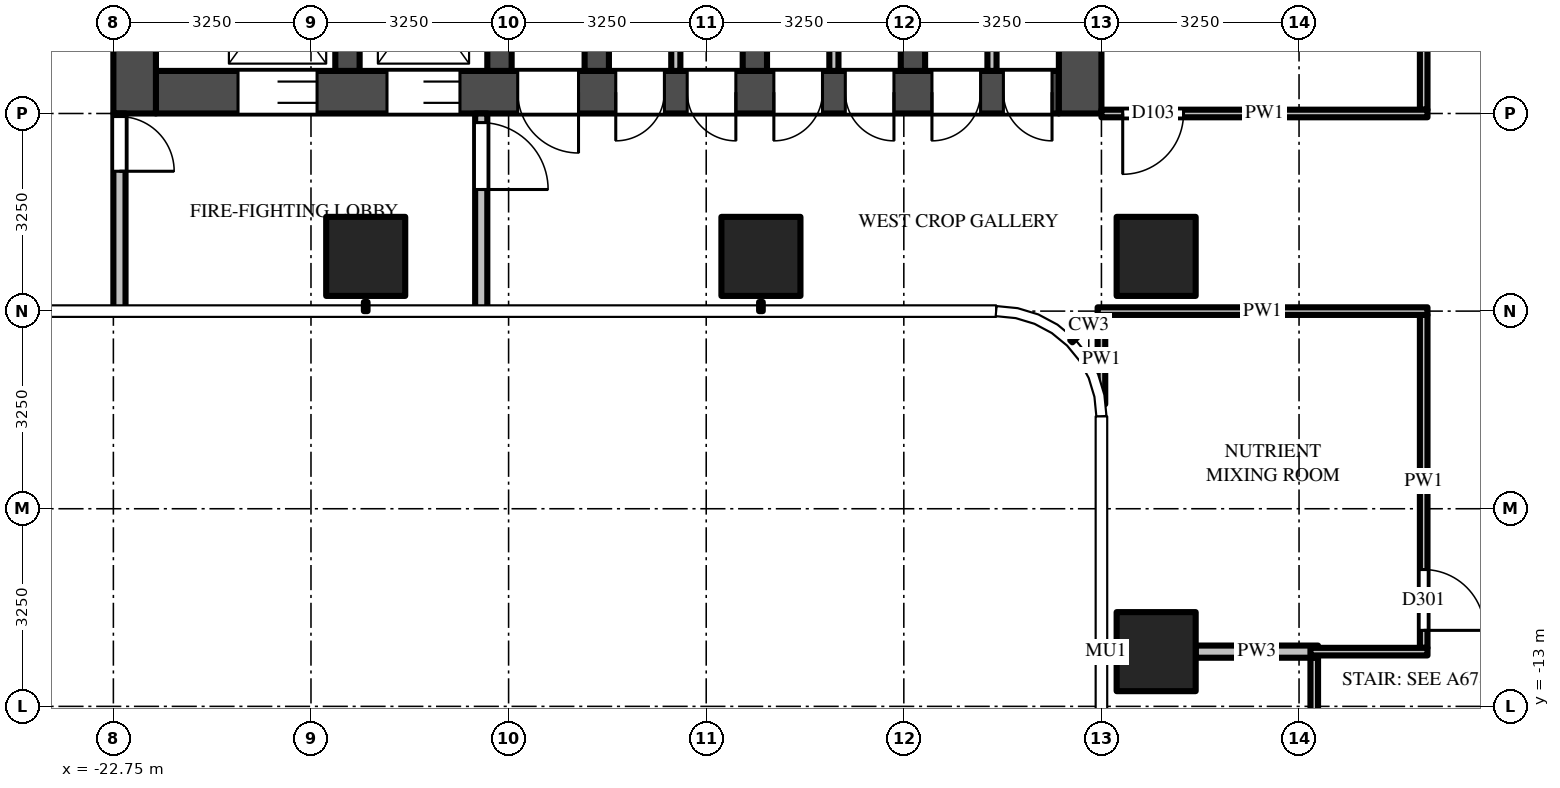
"""IFC4 building model, lengths in metres.
Left out: names, types, materials, properties, quantities, classifications, styles, units other than length and angle.
Written with IfcOpenShell. Run it as: python <this file> out.ifc"""

import sys

from ifc_helpers import new_model, si_unit, direction, frame, frame_2d, origin, origin_2d, place, context, subcontext, project, spatial, rectangle, extrude, source, transform, mapped, element, fill, save


model = new_model("IFC4")
c1 = context("Model", 3, precision=1e-05, world=origin(), true_north=direction((0.0, 1.0)))
c2 = subcontext(c1, "Body", "Model", "MODEL_VIEW")
j1 = project(units=[si_unit("LENGTHUNIT", "METRE"), si_unit("PLANEANGLEUNIT", "RADIAN")], contexts=[c1])
p1 = place(None, origin())
s1 = spatial("IfcSite", under=j1, at=p1, CompositionType="ELEMENT")
p2 = place(p1, origin())
s2 = spatial("IfcBuilding", under=s1, at=p2, CompositionType="ELEMENT")
p3 = place(p2, frame((0.0, 0.0, 115.5)))
s3 = spatial("IfcBuildingStorey", under=s2, at=p3, CompositionType="ELEMENT", Elevation=115.5)
m1 = source(origin(), c2, "Body", "SweptSolid", [
    extrude(rectangle(XDim=1.3, YDim=1.3, at=origin_2d()), origin(), (0.0, 0.0, 1.0), 4.5),
])
for number, where, z_axis, x_axis in (
    (1, (-5.6, -5.6, 0.0), (0.0, 0.0, 1.0), (1.0, 0.0, 0.0)),
    (2, (-5.6, -12.1, 0.0), (0.0, 0.0, 1.0), (1.0, 0.0, 0.0)),
    (3, (-12.1, -5.6, 0.0), (0.0, 0.0, 1.0), (1.0, 0.0, 0.0)),
    (4, (-18.6, -5.6, 0.0), (0.0, 0.0, 1.0), (1.0, 0.0, 0.0)),
):
    element("IfcColumn", number, at=place(p3, frame(where, z_axis=z_axis, x_axis=x_axis)), inside=s3, PredefinedType="COLUMN", context=c2, shape_type="MappedRepresentation", body=[
        mapped(m1, transform((0.0, 0.0, 0.0))),
    ])
m2 = source(origin(), c2, "Body", "SweptSolid", [
    extrude(rectangle(XDim=14.85, YDim=0.7, at=frame_2d((7.425, 0.0))), origin(), (0.0, 0.0, 1.0), 4.25),
])
p4 = place(p3, frame((-7.2, -2.9, 0.0), z_axis=(0.0, 0.0, 1.0), x_axis=(-1.0, 0.0, 0.0)))
e5 = element("IfcWall", 5, at=p4, inside=s3, PredefinedType="SHEAR", context=c2, shape_type="MappedRepresentation", body=[
    mapped(m2, transform((0.0, 0.0, 0.0))),
])
m3 = source(origin(), c2, "Body", "SweptSolid", [
    extrude(rectangle(XDim=1.3, YDim=2.1, at=frame_2d((0.65, 1.05))), frame((0.0, 0.36, 0.0), z_axis=(0.0, -1.0, 0.0), x_axis=(1.0, 0.0, 0.0)), (0.0, 0.0, 1.0), 0.72),
])
p5 = place(p4, frame((12.2, 0.0, 0.0)))
e6 = element("IfcOpeningElement", 6, at=p5, cuts=e5, PredefinedType="OPENING", context=c2, shape_type="MappedRepresentation", body=[
    mapped(m3, transform((0.0, 0.0, 0.0))),
])
m4 = source(origin(), c2, "Body", "SweptSolid", [
    extrude(rectangle(XDim=1.2, YDim=2.1, at=frame_2d((0.6, 1.05))), frame((0.0, 0.36, 0.0), z_axis=(0.0, -1.0, 0.0), x_axis=(1.0, 0.0, 0.0)), (0.0, 0.0, 1.0), 0.72),
])
p6 = place(p4, frame((9.85, 0.0, 0.0)))
e7 = element("IfcOpeningElement", 7, at=p6, cuts=e5, PredefinedType="OPENING", context=c2, shape_type="MappedRepresentation", body=[
    mapped(m4, transform((0.0, 0.0, 0.0))),
])
m5 = source(origin(), c2, "Body", "SweptSolid", [
    extrude(rectangle(XDim=1.0, YDim=2.1, at=frame_2d((0.5, 1.05))), frame((0.0, 0.36, 0.0), z_axis=(0.0, -1.0, 0.0), x_axis=(1.0, 0.0, 0.0)), (0.0, 0.0, 1.0), 0.72),
])
p7 = place(p4, frame((7.9, 0.0, 0.0)))
e8 = element("IfcOpeningElement", 8, at=p7, cuts=e5, PredefinedType="OPENING", context=c2, shape_type="MappedRepresentation", body=[
    mapped(m5, transform((0.0, 0.0, 0.0))),
])
m6 = source(origin(), c2, "Body", "SweptSolid", [
    extrude(rectangle(XDim=0.8, YDim=2.1, at=frame_2d((0.4, 1.05))), frame((0.0, 0.36, 0.0), z_axis=(0.0, -1.0, 0.0), x_axis=(1.0, 0.0, 0.0)), (0.0, 0.0, 1.0), 0.72),
])
p8 = place(p4, frame((0.113, 0.0, 0.0)))
e9 = element("IfcOpeningElement", 9, at=p8, cuts=e5, PredefinedType="OPENING", context=c2, shape_type="MappedRepresentation", body=[
    mapped(m6, transform((0.0, 0.0, 0.0))),
])
p9 = place(p4, frame((1.288, 0.0, 0.0)))
e10 = element("IfcOpeningElement", 10, at=p9, cuts=e5, PredefinedType="OPENING", context=c2, shape_type="MappedRepresentation", body=[
    mapped(m6, transform((0.0, 0.0, 0.0))),
])
p10 = place(p4, frame((2.712, 0.0, 0.0)))
e11 = element("IfcOpeningElement", 11, at=p10, cuts=e5, PredefinedType="OPENING", context=c2, shape_type="MappedRepresentation", body=[
    mapped(m6, transform((0.0, 0.0, 0.0))),
])
p11 = place(p4, frame((3.887, 0.0, 0.0)))
e12 = element("IfcOpeningElement", 12, at=p11, cuts=e5, PredefinedType="OPENING", context=c2, shape_type="MappedRepresentation", body=[
    mapped(m6, transform((0.0, 0.0, 0.0))),
])
p12 = place(p4, frame((5.312, 0.0, 0.0)))
e13 = element("IfcOpeningElement", 13, at=p12, cuts=e5, PredefinedType="OPENING", context=c2, shape_type="MappedRepresentation", body=[
    mapped(m6, transform((0.0, 0.0, 0.0))),
])
p13 = place(p4, frame((6.488, 0.0, 0.0)))
e14 = element("IfcOpeningElement", 14, at=p13, cuts=e5, PredefinedType="OPENING", context=c2, shape_type="MappedRepresentation", body=[
    mapped(m6, transform((0.0, 0.0, 0.0))),
])
m7 = source(origin(), c2, "Body", "SweptSolid", [
    extrude(rectangle(XDim=9.05, YDim=0.7, at=frame_2d((4.525, 0.0))), origin(), (0.0, 0.0, 1.0), 4.25),
])
p14 = place(p3, frame((-6.85, 5.8, 0.0), z_axis=(0.0, 0.0, 1.0), x_axis=(0.0, -1.0, 0.0)))
e15 = element("IfcWall", 15, at=p14, inside=s3, PredefinedType="SHEAR", context=c2, shape_type="MappedRepresentation", body=[
    mapped(m7, transform((0.0, 0.0, 0.0))),
])
m8 = source(origin(), c2, "Body", "SweptSolid", [
    extrude(rectangle(XDim=1.8, YDim=2.1, at=frame_2d((0.9, 1.05))), frame((0.0, 0.36, 0.0), z_axis=(0.0, -1.0, 0.0), x_axis=(1.0, 0.0, 0.0)), (0.0, 0.0, 1.0), 0.72),
])
p15 = place(p14, frame((3.15, 0.0, 0.0)))
e16 = element("IfcOpeningElement", 16, at=p15, cuts=e15, PredefinedType="OPENING", context=c2, shape_type="MappedRepresentation", body=[
    mapped(m8, transform((0.0, 0.0, 0.0))),
])
p16 = place(p3, frame((-22.4, 5.8, 0.0), z_axis=(0.0, 0.0, 1.0), x_axis=(0.0, -1.0, 0.0)))
e17 = element("IfcWall", 17, at=p16, inside=s3, PredefinedType="SHEAR", context=c2, shape_type="MappedRepresentation", body=[
    mapped(m7, transform((0.0, 0.0, 0.0))),
])
m9 = source(origin(), c2, "Body", "SweptSolid", [
    extrude(rectangle(XDim=2.45, YDim=0.4, at=frame_2d((1.225, 0.0))), origin(), (0.0, 0.0, 1.0), 4.25),
])
for number, where, z_axis, x_axis in (
    (18, (-9.6, -0.1, 0.0), (0.0, 0.0, 1.0), (0.0, -1.0, 0.0)),
    (19, (-12.2, -0.1, 0.0), (0.0, 0.0, 1.0), (0.0, -1.0, 0.0)),
    (20, (-14.8, -0.1, 0.0), (0.0, 0.0, 1.0), (0.0, -1.0, 0.0)),
    (21, (-16.4, -0.1, 0.0), (0.0, 0.0, 1.0), (0.0, -1.0, 0.0)),
    (22, (-18.9, -0.1, 0.0), (0.0, 0.0, 1.0), (0.0, -1.0, 0.0)),
):
    element("IfcWall", number, at=place(p3, frame(where, z_axis=z_axis, x_axis=x_axis)), inside=s3, PredefinedType="SHEAR", context=c2, shape_type="MappedRepresentation", body=[
        mapped(m9, transform((0.0, 0.0, 0.0))),
    ])
m10 = source(origin(), c2, "Body", "SweptSolid", [
    extrude(rectangle(XDim=3.25, YDim=0.2, at=frame_2d((1.625, 0.0))), origin(), (0.0, 0.0, 1.0), 4.25),
])
p17 = place(p3, frame((-16.7, -3.25, 0.0), z_axis=(0.0, 0.0, 1.0), x_axis=(0.0, -1.0, 0.0)))
e23 = element("IfcWall", 23, at=p17, inside=s3, PredefinedType="PARTITIONING", context=c2, shape_type="MappedRepresentation", body=[
    mapped(m10, transform((0.0, 0.0, 0.0))),
])
m11 = source(origin(), c2, "Body", "SweptSolid", [
    extrude(rectangle(XDim=1.1, YDim=2.1, at=frame_2d((0.55, 1.05))), frame((0.0, 0.11, 0.0), z_axis=(0.0, -1.0, 0.0), x_axis=(1.0, 0.0, 0.0)), (0.0, 0.0, 1.0), 0.22),
])
p18 = place(p17, frame((0.15, 0.0, 0.0)))
e24 = element("IfcOpeningElement", 24, at=p18, cuts=e23, PredefinedType="OPENING", context=c2, shape_type="MappedRepresentation", body=[
    mapped(m11, transform((0.0, 0.0, 0.0))),
])
p19 = place(p3, frame((-22.65, -3.25, 0.0), z_axis=(0.0, 0.0, 1.0), x_axis=(0.0, -1.0, 0.0)))
e25 = element("IfcWall", 25, at=p19, inside=s3, PredefinedType="PARTITIONING", context=c2, shape_type="MappedRepresentation", body=[
    mapped(m10, transform((0.0, 0.0, 0.0))),
])
m12 = source(origin(), c2, "Body", "SweptSolid", [
    extrude(rectangle(XDim=0.9, YDim=2.1, at=frame_2d((0.45, 1.05))), frame((0.0, 0.11, 0.0), z_axis=(0.0, -1.0, 0.0), x_axis=(1.0, 0.0, 0.0)), (0.0, 0.0, 1.0), 0.22),
])
p20 = place(p19, frame((0.05, 0.0, 0.0)))
e26 = element("IfcOpeningElement", 26, at=p20, cuts=e25, PredefinedType="OPENING", context=c2, shape_type="MappedRepresentation", body=[
    mapped(m12, transform((0.0, 0.0, 0.0))),
])
m13 = source(origin(), c2, "Body", "SweptSolid", [
    extrude(rectangle(XDim=2.45, YDim=0.15, at=frame_2d((1.225, 0.0))), origin(), (0.0, 0.0, 1.0), 4.25),
])
for number, where, z_axis, x_axis in (
    (27, (-8.3, -0.1, 0.0), (0.0, 0.0, 1.0), (0.0, -1.0, 0.0)),
    (28, (-10.9, -0.1, 0.0), (0.0, 0.0, 1.0), (0.0, -1.0, 0.0)),
    (29, (-13.5, -0.1, 0.0), (0.0, 0.0, 1.0), (0.0, -1.0, 0.0)),
):
    element("IfcWall", number, at=place(p3, frame(where, z_axis=z_axis, x_axis=x_axis)), inside=s3, PredefinedType="PARTITIONING", context=c2, shape_type="MappedRepresentation", body=[
        mapped(m13, transform((0.0, 0.0, 0.0))),
    ])
m14 = source(origin(), c2, "Body", "SweptSolid", [
    extrude(rectangle(XDim=1.469, YDim=0.125, at=frame_2d((0.734, 0.0))), origin(), (0.0, 0.0, 1.0), 4.25),
])
p21 = place(p3, frame((-6.5, -6.562, 0.0), z_axis=(0.0, 0.0, 1.0), x_axis=(0.0, -1.0, 0.0)))
e30 = element("IfcWall", 30, at=p21, inside=s3, PredefinedType="PARTITIONING", context=c2, shape_type="MappedRepresentation", body=[
    mapped(m14, transform((0.0, 0.0, 0.0))),
])
m15 = source(origin(), c2, "Body", "SweptSolid", [
    extrude(rectangle(XDim=8.738, YDim=0.125, at=frame_2d((4.369, 0.0))), origin(), (0.0, 0.0, 1.0), 3.468),
])
p22 = place(p3, frame((-3.0, -20.938, 0.0), z_axis=(0.0, 0.0, 1.0), x_axis=(0.0, 1.0, 0.0)))
e31 = element("IfcWall", 31, at=p22, inside=s3, PredefinedType="PARTITIONING", context=c2, shape_type="MappedRepresentation", body=[
    mapped(m15, transform((0.0, 0.0, 0.0))),
])
m16 = source(origin(), c2, "Body", "SweptSolid", [
    extrude(rectangle(XDim=5.475, YDim=0.125, at=frame_2d((2.738, 0.0))), origin(), (0.0, 0.0, 1.0), 3.468),
])
p23 = place(p3, frame((-1.2, -6.562, 0.0), z_axis=(0.0, 0.0, 1.0), x_axis=(0.0, -1.0, 0.0)))
e32 = element("IfcWall", 32, at=p23, inside=s3, PredefinedType="PARTITIONING", context=c2, shape_type="MappedRepresentation", body=[
    mapped(m16, transform((0.0, 0.0, 0.0))),
])
m17 = source(origin(), c2, "Body", "SweptSolid", [
    extrude(rectangle(XDim=1.0, YDim=2.1, at=frame_2d((0.5, 1.05))), frame((0.0, 0.073, 0.0), z_axis=(0.0, -1.0, 0.0), x_axis=(1.0, 0.0, 0.0)), (0.0, 0.0, 1.0), 0.145),
])
p24 = place(p23, frame((4.188, 0.0, 0.0)))
e33 = element("IfcOpeningElement", 33, at=p24, cuts=e32, PredefinedType="OPENING", context=c2, shape_type="MappedRepresentation", body=[
    mapped(m17, transform((0.0, 0.0, 0.0))),
])
m18 = source(origin(), c2, "Body", "SweptSolid", [
    extrude(rectangle(XDim=3.125, YDim=0.125, at=frame_2d((1.562, 0.0))), origin(), (0.0, 0.0, 1.0), 3.546),
])
p25 = place(p3, frame((-1.2, -0.062, 0.0), z_axis=(0.0, 0.0, 1.0), x_axis=(0.0, -1.0, 0.0)))
e34 = element("IfcWall", 34, at=p25, inside=s3, PredefinedType="PARTITIONING", context=c2, shape_type="MappedRepresentation", body=[
    mapped(m18, transform((0.0, 0.0, 0.0))),
])
m19 = source(origin(), c2, "Body", "SweptSolid", [
    extrude(rectangle(XDim=2.012, YDim=0.2, at=frame_2d((1.006, 0.0))), origin(), (0.0, 0.0, 1.0), 3.468),
])
p26 = place(p3, frame((-4.95, -12.1, 0.0), z_axis=(0.0, 0.0, 1.0), x_axis=(1.0, 0.0, 0.0)))
e35 = element("IfcWall", 35, at=p26, inside=s3, PredefinedType="PARTITIONING", context=c2, shape_type="MappedRepresentation", body=[
    mapped(m19, transform((0.0, 0.0, 0.0))),
])
m20 = source(origin(), c2, "Body", "SweptSolid", [
    extrude(rectangle(XDim=1.925, YDim=0.125, at=frame_2d((0.962, 0.0))), origin(), (0.0, 0.0, 1.0), 3.468),
])
p27 = place(p3, frame((-3.062, -12.1, 0.0), z_axis=(0.0, 0.0, 1.0), x_axis=(1.0, 0.0, 0.0)))
e36 = element("IfcWall", 36, at=p27, inside=s3, PredefinedType="PARTITIONING", context=c2, shape_type="MappedRepresentation", body=[
    mapped(m20, transform((0.0, 0.0, 0.0))),
])
m21 = source(origin(), c2, "Body", "SweptSolid", [
    extrude(rectangle(XDim=5.425, YDim=0.125, at=frame_2d((2.712, 0.0))), origin(), (0.0, 0.0, 1.0), 3.33),
])
p28 = place(p3, frame((-1.137, -6.5, 0.0), z_axis=(0.0, 0.0, 1.0), x_axis=(-1.0, 0.0, 0.0)))
e37 = element("IfcWall", 37, at=p28, inside=s3, PredefinedType="PARTITIONING", context=c2, shape_type="MappedRepresentation", body=[
    mapped(m21, transform((0.0, 0.0, 0.0))),
])
m22 = source(origin(), c2, "Body", "SweptSolid", [
    extrude(rectangle(XDim=5.363, YDim=0.125, at=frame_2d((2.681, 0.0))), origin(), (0.0, 0.0, 1.0), 3.468),
])
p29 = place(p3, frame((-1.137, -3.25, 0.0), z_axis=(0.0, 0.0, 1.0), x_axis=(-1.0, 0.0, 0.0)))
e38 = element("IfcWall", 38, at=p29, inside=s3, PredefinedType="PARTITIONING", context=c2, shape_type="MappedRepresentation", body=[
    mapped(m22, transform((0.0, 0.0, 0.0))),
])
p30 = place(p29, frame((4.012, 0.0, 0.0)))
e39 = element("IfcOpeningElement", 39, at=p30, cuts=e38, PredefinedType="OPENING", context=c2, shape_type="MappedRepresentation", body=[
    mapped(m17, transform((0.0, 0.0, 0.0))),
])
m23 = source(origin(), c2, "Body", "SweptSolid", [
    extrude(rectangle(XDim=1.3, YDim=2.1, at=frame_2d((0.65, 1.05))), frame((0.0, -0.275, 0.0), z_axis=(0.0, -1.0, 0.0), x_axis=(1.0, 0.0, 0.0)), (0.0, 0.0, 1.0), 0.05),
])
p31 = place(p5, origin())
e40 = element("IfcDoor", 40, at=p31, inside=s3, OperationType="DOUBLE_DOOR_SLIDING", PredefinedType="DOOR", context=c2, shape_type="MappedRepresentation", body=[
    mapped(m23, transform((0.0, 0.0, 0.0))),
])
fill(e6, e40)
m24 = source(origin(), c2, "Body", "SweptSolid", [
    extrude(rectangle(XDim=1.2, YDim=2.1, at=frame_2d((0.6, 1.05))), frame((0.0, -0.275, 0.0), z_axis=(0.0, -1.0, 0.0), x_axis=(1.0, 0.0, 0.0)), (0.0, 0.0, 1.0), 0.05),
])
p32 = place(p6, origin())
e41 = element("IfcDoor", 41, at=p32, inside=s3, OperationType="DOUBLE_DOOR_SLIDING", PredefinedType="DOOR", context=c2, shape_type="MappedRepresentation", body=[
    mapped(m24, transform((0.0, 0.0, 0.0))),
])
fill(e7, e41)
m25 = source(origin(), c2, "Body", "SweptSolid", [
    extrude(rectangle(XDim=1.0, YDim=2.1, at=frame_2d((0.5, 1.05))), frame((0.0, -0.275, 0.0), z_axis=(0.0, -1.0, 0.0), x_axis=(1.0, 0.0, 0.0)), (0.0, 0.0, 1.0), 0.05),
])
p33 = place(p7, origin())
e42 = element("IfcDoor", 42, at=p33, inside=s3, OperationType="SINGLE_SWING_LEFT", PredefinedType="DOOR", context=c2, shape_type="MappedRepresentation", body=[
    mapped(m25, transform((0.0, 0.0, 0.0))),
])
fill(e8, e42)
m26 = source(origin(), c2, "Body", "SweptSolid", [
    extrude(rectangle(XDim=1.1, YDim=2.1, at=frame_2d((0.55, 1.05))), frame((0.0, 0.025, 0.0), z_axis=(0.0, -1.0, 0.0), x_axis=(1.0, 0.0, 0.0)), (0.0, 0.0, 1.0), 0.05),
])
p34 = place(p18, origin())
e43 = element("IfcDoor", 43, at=p34, inside=s3, OperationType="SINGLE_SWING_RIGHT", PredefinedType="DOOR", context=c2, shape_type="MappedRepresentation", body=[
    mapped(m26, transform((0.0, 0.0, 0.0))),
])
fill(e24, e43)
m27 = source(origin(), c2, "Body", "SweptSolid", [
    extrude(rectangle(XDim=0.9, YDim=2.1, at=frame_2d((0.45, 1.05))), frame((0.0, 0.025, 0.0), z_axis=(0.0, -1.0, 0.0), x_axis=(1.0, 0.0, 0.0)), (0.0, 0.0, 1.0), 0.05),
])
p35 = place(p20, origin())
e44 = element("IfcDoor", 44, at=p35, inside=s3, OperationType="SINGLE_SWING_RIGHT", PredefinedType="DOOR", context=c2, shape_type="MappedRepresentation", body=[
    mapped(m27, transform((0.0, 0.0, 0.0))),
])
fill(e26, e44)
m28 = source(origin(), c2, "Body", "SweptSolid", [
    extrude(rectangle(XDim=0.8, YDim=2.1, at=frame_2d((0.4, 1.05))), frame((0.0, -0.275, 0.0), z_axis=(0.0, -1.0, 0.0), x_axis=(1.0, 0.0, 0.0)), (0.0, 0.0, 1.0), 0.05),
])
p36 = place(p8, origin())
e45 = element("IfcDoor", 45, at=p36, inside=s3, OperationType="SINGLE_SWING_LEFT", PredefinedType="DOOR", context=c2, shape_type="MappedRepresentation", body=[
    mapped(m28, transform((0.0, 0.0, 0.0))),
])
fill(e9, e45)
p37 = place(p9, origin())
e46 = element("IfcDoor", 46, at=p37, inside=s3, OperationType="SINGLE_SWING_RIGHT", PredefinedType="DOOR", context=c2, shape_type="MappedRepresentation", body=[
    mapped(m28, transform((0.0, 0.0, 0.0))),
])
fill(e10, e46)
p38 = place(p10, origin())
e47 = element("IfcDoor", 47, at=p38, inside=s3, OperationType="SINGLE_SWING_LEFT", PredefinedType="DOOR", context=c2, shape_type="MappedRepresentation", body=[
    mapped(m28, transform((0.0, 0.0, 0.0))),
])
fill(e11, e47)
p39 = place(p11, origin())
e48 = element("IfcDoor", 48, at=p39, inside=s3, OperationType="SINGLE_SWING_RIGHT", PredefinedType="DOOR", context=c2, shape_type="MappedRepresentation", body=[
    mapped(m28, transform((0.0, 0.0, 0.0))),
])
fill(e12, e48)
p40 = place(p12, origin())
e49 = element("IfcDoor", 49, at=p40, inside=s3, OperationType="SINGLE_SWING_LEFT", PredefinedType="DOOR", context=c2, shape_type="MappedRepresentation", body=[
    mapped(m28, transform((0.0, 0.0, 0.0))),
])
fill(e13, e49)
p41 = place(p13, origin())
e50 = element("IfcDoor", 50, at=p41, inside=s3, OperationType="SINGLE_SWING_RIGHT", PredefinedType="DOOR", context=c2, shape_type="MappedRepresentation", body=[
    mapped(m28, transform((0.0, 0.0, 0.0))),
])
fill(e14, e50)
m29 = source(origin(), c2, "Body", "SweptSolid", [
    extrude(rectangle(XDim=1.0, YDim=2.1, at=frame_2d((0.5, 1.05))), frame((0.0, 0.025, 0.0), z_axis=(0.0, -1.0, 0.0), x_axis=(1.0, 0.0, 0.0)), (0.0, 0.0, 1.0), 0.05),
])
p42 = place(p24, origin())
e51 = element("IfcDoor", 51, at=p42, inside=s3, OperationType="SINGLE_SWING_RIGHT", PredefinedType="DOOR", context=c2, shape_type="MappedRepresentation", body=[
    mapped(m29, transform((0.0, 0.0, 0.0))),
])
fill(e33, e51)
p43 = place(p30, origin())
e52 = element("IfcDoor", 52, at=p43, inside=s3, OperationType="SINGLE_SWING_RIGHT", PredefinedType="DOOR", context=c2, shape_type="MappedRepresentation", body=[
    mapped(m29, transform((0.0, 0.0, 0.0))),
])
fill(e39, e52)
save(model, sys.argv[1])
